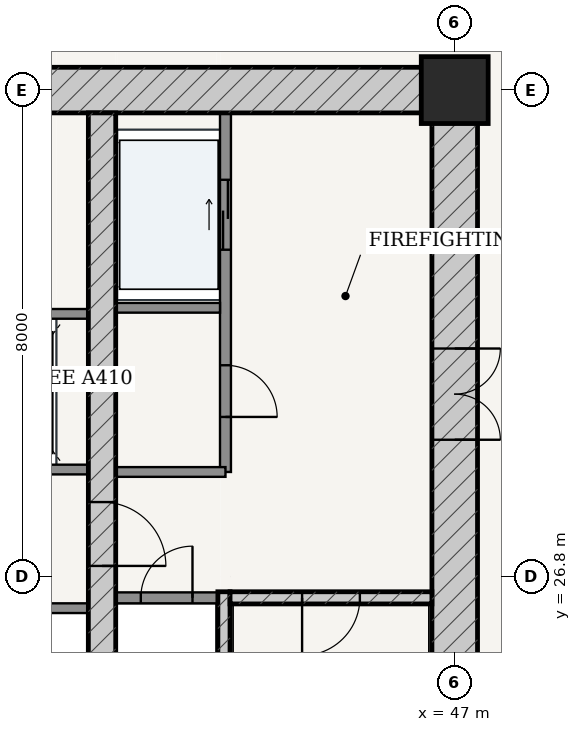
"""IFC4 building model, lengths in metres.
Left out: names, types, materials, properties, quantities, classifications, styles, units other than length and angle.
Written with IfcOpenShell. Run it as: python <this file> out.ifc"""

import sys

from ifc_helpers import new_model, si_unit, direction, frame, frame_2d, origin, origin_2d, place, context, subcontext, project, spatial, rectangle, extrude, source, transform, mapped, element, fill, save


model = new_model("IFC4")
c1 = context("Model", 3, precision=1e-05, world=origin(), true_north=direction((-0.2419218956, 0.970295726276)))
c2 = subcontext(c1, "Body", "Model", "MODEL_VIEW")
j1 = project(units=[si_unit("LENGTHUNIT", "METRE"), si_unit("PLANEANGLEUNIT", "RADIAN")], contexts=[c1])
p1 = place(None, origin())
s1 = spatial("IfcSite", under=j1, at=p1, CompositionType="ELEMENT")
p2 = place(p1, origin())
s2 = spatial("IfcBuilding", under=s1, at=p2, CompositionType="ELEMENT")
p3 = place(p2, frame((0.0, 0.0, 38.4)))
s3 = spatial("IfcBuildingStorey", under=s2, at=p3, CompositionType="ELEMENT", Elevation=38.4)
p4 = place(p3, frame((47.0, 34.8, 0.0), z_axis=(0.0, 0.0, 1.0), x_axis=(1.0, 0.0, 0.0)))
e1 = element("IfcColumn", 1, at=p4, inside=s3, PredefinedType="COLUMN", context=c2, shape_type="SweptSolid", body=[
    extrude(rectangle(XDim=1.1, YDim=1.1, at=origin_2d()), origin(), (0.0, 0.0, 1.0), 3.6),
])
p5 = place(p3, frame((28.625, 34.8, 0.0), z_axis=(0.0, 0.0, 1.0), x_axis=(1.0, 0.0, 0.0)))
e2 = element("IfcWall", 2, at=p5, inside=s3, PredefinedType="SHEAR", context=c2, shape_type="SweptSolid", body=[
    extrude(rectangle(XDim=18.75, YDim=0.75, at=frame_2d((9.375, 0.0))), origin(), (0.0, 0.0, 1.0), 3.32),
])
p6 = place(p5, frame((7.407, 0.0, 0.0)))
e3 = element("IfcOpeningElement", 3, at=p6, cuts=e2, PredefinedType="OPENING", context=c2, shape_type="SweptSolid", body=[
    extrude(rectangle(XDim=0.86, YDim=2.1, at=frame_2d((0.43, 1.05))), frame((0.0, 0.385, 0.0), z_axis=(0.0, -1.0, 0.0), x_axis=(1.0, 0.0, 0.0)), (0.0, 0.0, 1.0), 0.77),
])
p7 = place(p5, frame((10.488, 0.0, 0.0)))
e4 = element("IfcOpeningElement", 4, at=p7, cuts=e2, PredefinedType="OPENING", context=c2, shape_type="SweptSolid", body=[
    extrude(rectangle(XDim=0.85, YDim=2.1, at=frame_2d((0.425, 1.05))), frame((0.0, 0.385, 0.0), z_axis=(0.0, -1.0, 0.0), x_axis=(1.0, 0.0, 0.0)), (0.0, 0.0, 1.0), 0.77),
])
p8 = place(p3, frame((47.0, 19.175, 0.0), z_axis=(0.0, 0.0, 1.0), x_axis=(0.0, 1.0, 0.0)))
e5 = element("IfcWall", 5, at=p8, inside=s3, PredefinedType="SHEAR", context=c2, shape_type="SweptSolid", body=[
    extrude(rectangle(XDim=15.25, YDim=0.75, at=frame_2d((7.625, 0.0))), origin(), (0.0, 0.0, 1.0), 3.32),
])
p9 = place(p8, frame((9.875, 0.0, 0.0)))
e6 = element("IfcOpeningElement", 6, at=p9, cuts=e5, PredefinedType="OPENING", context=c2, shape_type="SweptSolid", body=[
    extrude(rectangle(XDim=1.5, YDim=2.2, at=frame_2d((0.75, 1.1))), frame((0.0, 0.385, 0.0), z_axis=(0.0, -1.0, 0.0), x_axis=(1.0, 0.0, 0.0)), (0.0, 0.0, 1.0), 0.77),
])
p10 = place(p3, frame((43.205, 19.175, 0.0), z_axis=(0.0, 0.0, 1.0), x_axis=(0.0, 1.0, 0.0)))
e7 = element("IfcWall", 7, at=p10, inside=s3, PredefinedType="SOLIDWALL", context=c2, shape_type="SweptSolid", body=[
    extrude(rectangle(XDim=7.375, YDim=0.2, at=frame_2d((3.688, 0.0))), origin(), (0.0, 0.0, 1.0), 3.32),
])
p11 = place(p3, frame((43.305, 26.45, 0.0), z_axis=(0.0, 0.0, 1.0), x_axis=(1.0, 0.0, 0.0)))
e8 = element("IfcWall", 8, at=p11, inside=s3, PredefinedType="SOLIDWALL", context=c2, shape_type="SweptSolid", body=[
    extrude(rectangle(XDim=3.32, YDim=0.2, at=frame_2d((1.66, 0.0))), origin(), (0.0, 0.0, 1.0), 3.32),
])
p12 = place(p11, frame((1.185, 0.0, 0.0)))
e9 = element("IfcOpeningElement", 9, at=p12, cuts=e8, PredefinedType="OPENING", context=c2, shape_type="SweptSolid", body=[
    extrude(rectangle(XDim=0.95, YDim=2.15, at=frame_2d((0.475, 1.075))), frame((0.0, 0.11, 0.0), z_axis=(0.0, -1.0, 0.0), x_axis=(1.0, 0.0, 0.0)), (0.0, 0.0, 1.0), 0.22),
])
p13 = place(p3, frame((41.2, 19.175, 0.0), z_axis=(0.0, 0.0, 1.0), x_axis=(0.0, 1.0, 0.0)))
e10 = element("IfcWall", 10, at=p13, inside=s3, PredefinedType="SHEAR", context=c2, shape_type="SweptSolid", body=[
    extrude(rectangle(XDim=15.25, YDim=0.45, at=frame_2d((7.625, 0.0))), origin(), (0.0, 0.0, 1.0), 3.32),
])
p14 = place(p13, frame((7.8, 0.0, 0.0)))
e11 = element("IfcOpeningElement", 11, at=p14, cuts=e10, PredefinedType="OPENING", context=c2, shape_type="SweptSolid", body=[
    extrude(rectangle(XDim=1.05, YDim=2.15, at=frame_2d((0.525, 1.075))), frame((0.0, 0.235, 0.0), z_axis=(0.0, -1.0, 0.0), x_axis=(1.0, 0.0, 0.0)), (0.0, 0.0, 1.0), 0.47),
])
p15 = place(p3, frame((41.425, 26.45, 0.0), z_axis=(0.0, 0.0, 1.0), x_axis=(1.0, 0.0, 0.0)))
e12 = element("IfcWall", 12, at=p15, inside=s3, PredefinedType="PARTITIONING", context=c2, shape_type="SweptSolid", body=[
    extrude(rectangle(XDim=1.675, YDim=0.18, at=frame_2d((0.837, 0.0))), origin(), (0.0, 0.0, 1.0), 3.32),
])
p16 = place(p15, frame((0.413, 0.0, 0.0)))
e13 = element("IfcOpeningElement", 13, at=p16, cuts=e12, PredefinedType="OPENING", context=c2, shape_type="SweptSolid", body=[
    extrude(rectangle(XDim=0.85, YDim=2.1, at=frame_2d((0.425, 1.05))), frame((0.0, 0.1, 0.0), z_axis=(0.0, -1.0, 0.0), x_axis=(1.0, 0.0, 0.0)), (0.0, 0.0, 1.0), 0.2),
])
p17 = place(p3, frame((43.23, 28.52, 0.0), z_axis=(0.0, 0.0, 1.0), x_axis=(0.0, 1.0, 0.0)))
e14 = element("IfcWall", 14, at=p17, inside=s3, PredefinedType="PARTITIONING", context=c2, shape_type="SweptSolid", body=[
    extrude(rectangle(XDim=5.905, YDim=0.18, at=frame_2d((2.953, 0.0))), origin(), (0.0, 0.0, 1.0), 3.32),
])
p18 = place(p17, frame((0.905, 0.0, 0.0)))
e15 = element("IfcOpeningElement", 15, at=p18, cuts=e14, PredefinedType="OPENING", context=c2, shape_type="SweptSolid", body=[
    extrude(rectangle(XDim=0.85, YDim=2.1, at=frame_2d((0.425, 1.05))), frame((0.0, 0.1, 0.0), z_axis=(0.0, -1.0, 0.0), x_axis=(1.0, 0.0, 0.0)), (0.0, 0.0, 1.0), 0.2),
])
p19 = place(p17, frame((3.655, 0.0, 0.0)))
e16 = element("IfcOpeningElement", 16, at=p19, cuts=e14, PredefinedType="OPENING", context=c2, shape_type="SweptSolid", body=[
    extrude(rectangle(XDim=1.15, YDim=2.2, at=frame_2d((0.575, 1.1))), frame((0.0, 0.1, 0.0), z_axis=(0.0, -1.0, 0.0), x_axis=(1.0, 0.0, 0.0)), (0.0, 0.0, 1.0), 0.2),
])
p20 = place(p3, frame((41.425, 31.22, 0.0), z_axis=(0.0, 0.0, 1.0), x_axis=(1.0, 0.0, 0.0)))
e17 = element("IfcWall", 17, at=p20, inside=s3, PredefinedType="PARTITIONING", context=c2, shape_type="SweptSolid", body=[
    extrude(rectangle(XDim=1.715, YDim=0.16, at=frame_2d((0.857, 0.0))), origin(), (0.0, 0.0, 1.0), 3.32),
])
p21 = place(p3, frame((41.425, 28.52, 0.0), z_axis=(0.0, 0.0, 1.0), x_axis=(1.0, 0.0, 0.0)))
e18 = element("IfcWall", 18, at=p21, inside=s3, PredefinedType="PARTITIONING", context=c2, shape_type="SweptSolid", body=[
    extrude(rectangle(XDim=1.805, YDim=0.16, at=frame_2d((0.902, 0.0))), origin(), (0.0, 0.0, 1.0), 3.32),
])
p22 = place(p3, frame((35.025, 28.56, 0.0), z_axis=(0.0, 0.0, 1.0), x_axis=(1.0, 0.0, 0.0)))
e19 = element("IfcWall", 19, at=p22, inside=s3, PredefinedType="PARTITIONING", context=c2, shape_type="SweptSolid", body=[
    extrude(rectangle(XDim=5.95, YDim=0.16, at=frame_2d((2.975, 0.0))), origin(), (0.0, 0.0, 1.0), 3.32),
])
p23 = place(p22, frame((0.76, 0.0, 0.0)))
e20 = element("IfcOpeningElement", 20, at=p23, cuts=e19, PredefinedType="OPENING", context=c2, shape_type="SweptSolid", body=[
    extrude(rectangle(XDim=1.1, YDim=2.2, at=frame_2d((0.55, 1.1))), frame((0.0, 0.09, 0.0), z_axis=(0.0, -1.0, 0.0), x_axis=(1.0, 0.0, 0.0)), (0.0, 0.0, 1.0), 0.18),
])
p24 = place(p22, frame((2.425, 0.0, 0.0)))
e21 = element("IfcOpeningElement", 21, at=p24, cuts=e19, PredefinedType="OPENING", context=c2, shape_type="SweptSolid", body=[
    extrude(rectangle(XDim=1.1, YDim=2.2, at=frame_2d((0.55, 1.1))), frame((0.0, 0.09, 0.0), z_axis=(0.0, -1.0, 0.0), x_axis=(1.0, 0.0, 0.0)), (0.0, 0.0, 1.0), 0.18),
])
p25 = place(p22, frame((4.09, 0.0, 0.0)))
e22 = element("IfcOpeningElement", 22, at=p25, cuts=e19, PredefinedType="OPENING", context=c2, shape_type="SweptSolid", body=[
    extrude(rectangle(XDim=1.1, YDim=2.2, at=frame_2d((0.55, 1.1))), frame((0.0, 0.09, 0.0), z_axis=(0.0, -1.0, 0.0), x_axis=(1.0, 0.0, 0.0)), (0.0, 0.0, 1.0), 0.18),
])
for number, where, z_axis, x_axis in (
    (23, (35.025, 31.12, 0.0), (0.0, 0.0, 1.0), (1.0, 0.0, 0.0)),
    (24, (35.025, 26.28, 0.0), (0.0, 0.0, 1.0), (1.0, 0.0, 0.0)),
):
    element("IfcWall", number, at=place(p3, frame(where, z_axis=z_axis, x_axis=x_axis)), inside=s3, PredefinedType="PARTITIONING", context=c2, shape_type="SweptSolid", body=[
        extrude(rectangle(XDim=5.95, YDim=0.16, at=frame_2d((2.975, 0.0))), origin(), (0.0, 0.0, 1.0), 3.32),
    ])
m1 = source(origin(), c2, "Body", "SweptSolid", [
    extrude(rectangle(XDim=1.5, YDim=2.2, at=frame_2d((0.75, 1.1))), frame((0.0, 0.025, 0.0), z_axis=(0.0, -1.0, 0.0), x_axis=(1.0, 0.0, 0.0)), (0.0, 0.0, 1.0), 0.05),
])
p26 = place(p9, frame((1.5, 0.0, 0.0), z_axis=(0.0, 0.0, 1.0), x_axis=(-1.0, 0.0, 0.0)))
e25 = element("IfcDoor", 25, at=p26, inside=s3, OperationType="DOUBLE_DOOR_SINGLE_SWING", PredefinedType="DOOR", context=c2, shape_type="MappedRepresentation", body=[
    mapped(m1, transform((0.0, 0.0, 0.0), scale=1.0)),
])
fill(e6, e25)
m2 = source(origin(), c2, "Body", "SweptSolid", [
    extrude(rectangle(XDim=1.05, YDim=2.15, at=frame_2d((0.525, 1.075))), frame((0.0, 0.025, 0.0), z_axis=(0.0, -1.0, 0.0), x_axis=(1.0, 0.0, 0.0)), (0.0, 0.0, 1.0), 0.05),
])
p27 = place(p14, frame((1.05, 0.0, 0.0), z_axis=(0.0, 0.0, 1.0), x_axis=(-1.0, 0.0, 0.0)))
e26 = element("IfcDoor", 26, at=p27, inside=s3, OperationType="SINGLE_SWING_RIGHT", PredefinedType="DOOR", context=c2, shape_type="MappedRepresentation", body=[
    mapped(m2, transform((0.0, 0.0, 0.0), scale=1.0)),
])
fill(e11, e26)
m3 = source(origin(), c2, "Body", "SweptSolid", [
    extrude(rectangle(XDim=0.95, YDim=2.15, at=frame_2d((0.475, 1.075))), frame((0.0, 0.025, 0.0), z_axis=(0.0, -1.0, 0.0), x_axis=(1.0, 0.0, 0.0)), (0.0, 0.0, 1.0), 0.05),
])
p28 = place(p12, frame((0.95, 0.0, 0.0), z_axis=(0.0, 0.0, 1.0), x_axis=(-1.0, 0.0, 0.0)))
e27 = element("IfcDoor", 27, at=p28, inside=s3, OperationType="SINGLE_SWING_RIGHT", PredefinedType="DOOR", context=c2, shape_type="MappedRepresentation", body=[
    mapped(m3, transform((0.0, 0.0, 0.0), scale=1.0)),
])
fill(e9, e27)
m4 = source(origin(), c2, "Body", "SweptSolid", [
    extrude(rectangle(XDim=0.85, YDim=2.1, at=frame_2d((0.425, 1.05))), frame((0.0, 0.025, 0.0), z_axis=(0.0, -1.0, 0.0), x_axis=(1.0, 0.0, 0.0)), (0.0, 0.0, 1.0), 0.05),
])
p29 = place(p16, origin())
e28 = element("IfcDoor", 28, at=p29, inside=s3, OperationType="SINGLE_SWING_RIGHT", PredefinedType="DOOR", context=c2, shape_type="MappedRepresentation", body=[
    mapped(m4, transform((0.0, 0.0, 0.0), scale=1.0)),
])
fill(e13, e28)
p30 = place(p18, frame((0.85, 0.0, 0.0), z_axis=(0.0, 0.0, 1.0), x_axis=(-1.0, 0.0, 0.0)))
e29 = element("IfcDoor", 29, at=p30, inside=s3, OperationType="SINGLE_SWING_RIGHT", PredefinedType="DOOR", context=c2, shape_type="MappedRepresentation", body=[
    mapped(m4, transform((0.0, 0.0, 0.0), scale=1.0)),
])
fill(e15, e29)
m5 = source(origin(), c2, "Body", "SweptSolid", [
    extrude(rectangle(XDim=1.15, YDim=2.2, at=frame_2d((0.575, 1.1))), frame((0.0, 0.025, 0.0), z_axis=(0.0, -1.0, 0.0), x_axis=(1.0, 0.0, 0.0)), (0.0, 0.0, 1.0), 0.05),
])
p31 = place(p19, origin())
e30 = element("IfcDoor", 30, at=p31, inside=s3, OperationType="DOUBLE_DOOR_SLIDING", PredefinedType="DOOR", context=c2, shape_type="MappedRepresentation", body=[
    mapped(m5, transform((0.0, 0.0, 0.0), scale=1.0)),
])
fill(e16, e30)
save(model, sys.argv[1])
